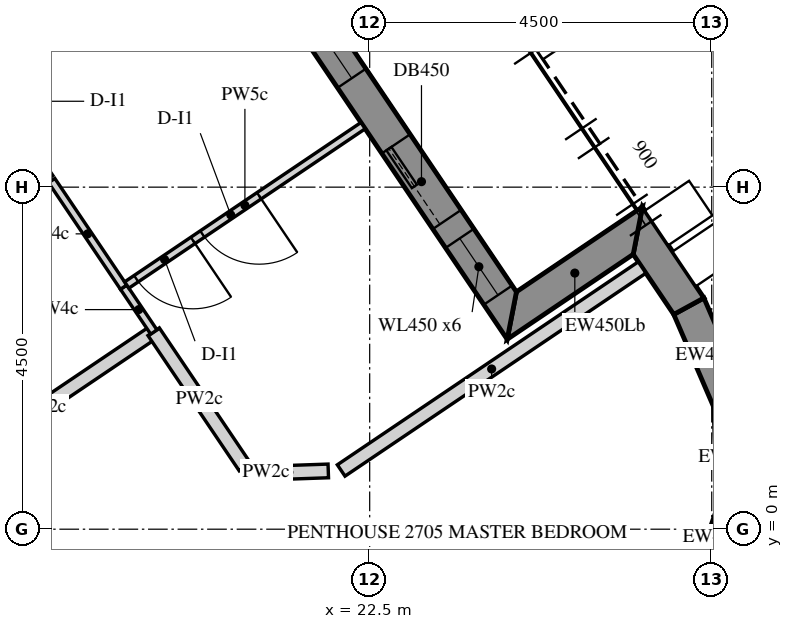
"""IFC4 building model, lengths in metres.
Left out: names, types, materials, properties, quantities, classifications, styles, units other than length and angle.
Written with IfcOpenShell. Run it as: python <this file> out.ifc"""

import sys

from ifc_helpers import new_model, si_unit, direction, frame, frame_2d, origin, place, context, subcontext, project, spatial, polyline, rectangle, outline, extrude, element, fill, save


model = new_model("IFC4")
c1 = context("Model", 3, precision=1e-05, world=origin(), true_north=direction((0.0, 1.0)))
c2 = subcontext(c1, "Body", "Model", "MODEL_VIEW")
j1 = project(units=[si_unit("LENGTHUNIT", "METRE"), si_unit("PLANEANGLEUNIT", "RADIAN")], contexts=[c1])
p1 = place(None, origin())
s1 = spatial("IfcSite", under=j1, at=p1, CompositionType="ELEMENT")
p2 = place(p1, origin())
s2 = spatial("IfcBuilding", under=s1, at=p2, CompositionType="ELEMENT")
p3 = place(p2, frame((0.0, 0.0, 349.5)))
s3 = spatial("IfcBuildingStorey", under=s2, at=p3, CompositionType="ELEMENT", Elevation=349.5)
p4 = place(p3, frame((26.838, -1.064, 0.0), z_axis=(0.0, 0.0, 1.0), x_axis=(0.331074067573, 0.943604769901, 0.0)))
e1 = element("IfcWall", 1, at=p4, inside=s3, PredefinedType="SOLIDWALL", context=c2, shape_type="SweptSolid", body=[
    extrude(outline(polyline([(-0.021, -0.225), (1.44, -0.225), (1.355, 0.225), (0.021, 0.225), (-0.021, -0.225)])), origin(), (0.0, 0.0, 1.0), 3.75),
])
p5 = place(p3, frame((27.301, 0.254, 0.0), z_axis=(0.0, 0.0, 1.0), x_axis=(-0.034763104447, 0.999395580623, 0.0)))
e2 = element("IfcWall", 2, at=p5, inside=s3, PredefinedType="SOLIDWALL", context=c2, shape_type="SweptSolid", body=[
    extrude(outline(polyline([(-0.042, -0.225), (1.44, -0.225), (1.355, 0.225), (0.042, 0.225), (-0.042, -0.225)])), origin(), (0.0, 0.0, 1.0), 3.75),
])
p6 = place(p3, frame((27.252, 1.651, 0.0), z_axis=(0.0, 0.0, 1.0), x_axis=(-0.396195073027, 0.918166359713, 0.0)))
e3 = element("IfcWall", 3, at=p6, inside=s3, PredefinedType="SOLIDWALL", context=c2, shape_type="SweptSolid", body=[
    extrude(outline(polyline([(-0.042, -0.225), (1.418, -0.225), (1.376, 0.225), (0.042, 0.225), (-0.042, -0.225)])), origin(), (0.0, 0.0, 1.0), 3.75),
])
p7 = place(p3, frame((26.699, 2.934, 0.0), z_axis=(0.0, 0.0, 1.0), x_axis=(-0.559105892217, 0.829096255744, 0.0)))
e4 = element("IfcWall", 4, at=p7, inside=s3, PredefinedType="SOLIDWALL", context=c2, shape_type="SweptSolid", body=[
    extrude(outline(polyline([(-0.021, -0.225), (1.425, -0.225), (0.975, 0.225), (0.021, 0.225), (-0.021, -0.225)])), origin(), (0.0, 0.0, 1.0), 3.75),
])
p8 = place(p3, frame((26.028, 3.929, 0.0), z_axis=(0.0, 0.0, 1.0), x_axis=(-0.829052389485, -0.559170935841, 0.0)))
e5 = element("IfcWall", 5, at=p8, inside=s3, PredefinedType="SOLIDWALL", context=c2, shape_type="SweptSolid", body=[
    extrude(outline(polyline([(-0.225, -0.225), (1.775, -0.225), (2.225, 0.225), (0.225, 0.225), (-0.225, -0.225)])), origin(), (0.0, 0.0, 1.0), 3.75),
])
p9 = place(p3, frame((24.37, 2.811, 0.0), z_axis=(0.0, 0.0, 1.0), x_axis=(-0.559187034749, 0.829041531027, 0.0)))
e6 = element("IfcWall", 6, at=p9, inside=s3, PredefinedType="SOLIDWALL", context=c2, shape_type="SweptSolid", body=[
    extrude(outline(polyline([(0.225, -0.225), (20.506, -0.225), (20.957, 0.225), (-0.225, 0.225), (0.225, -0.225)])), origin(), (0.0, 0.0, 1.0), 3.75),
])
p10 = place(p9, frame((0.325, 0.0, 0.9)))
e7 = element("IfcOpeningElement", 7, at=p10, cuts=e6, PredefinedType="OPENING", context=c2, shape_type="SweptSolid", body=[
    extrude(rectangle(XDim=0.9, YDim=1.5, at=frame_2d((0.45, 0.75))), frame((0.0, 0.235, 0.0), z_axis=(0.0, -1.0, 0.0), x_axis=(1.0, 0.0, 0.0)), (0.0, 0.0, 1.0), 0.47),
])
p11 = place(p9, frame((1.525, 0.0, 0.0)))
e8 = element("IfcOpeningElement", 8, at=p11, cuts=e6, PredefinedType="OPENING", context=c2, shape_type="SweptSolid", body=[
    extrude(rectangle(XDim=1.2, YDim=2.4, at=frame_2d((0.6, 1.2))), frame((0.0, 0.235, 0.0), z_axis=(0.0, -1.0, 0.0), x_axis=(1.0, 0.0, 0.0)), (0.0, 0.0, 1.0), 0.47),
])
p12 = place(p9, frame((3.766, 0.0, 0.9)))
e9 = element("IfcOpeningElement", 9, at=p12, cuts=e6, PredefinedType="OPENING", context=c2, shape_type="SweptSolid", body=[
    extrude(rectangle(XDim=0.9, YDim=1.5, at=frame_2d((0.45, 0.75))), frame((0.0, 0.235, 0.0), z_axis=(0.0, -1.0, 0.0), x_axis=(1.0, 0.0, 0.0)), (0.0, 0.0, 1.0), 0.47),
])
p13 = place(p9, frame((4.966, 0.0, 0.0)))
e10 = element("IfcOpeningElement", 10, at=p13, cuts=e6, PredefinedType="OPENING", context=c2, shape_type="SweptSolid", body=[
    extrude(rectangle(XDim=1.2, YDim=2.4, at=frame_2d((0.6, 1.2))), frame((0.0, 0.235, 0.0), z_axis=(0.0, -1.0, 0.0), x_axis=(1.0, 0.0, 0.0)), (0.0, 0.0, 1.0), 0.47),
])
p14 = place(p9, frame((7.366, 0.0, 0.9)))
e11 = element("IfcOpeningElement", 11, at=p14, cuts=e6, PredefinedType="OPENING", context=c2, shape_type="SweptSolid", body=[
    extrude(rectangle(XDim=0.9, YDim=1.5, at=frame_2d((0.45, 0.75))), frame((0.0, 0.235, 0.0), z_axis=(0.0, -1.0, 0.0), x_axis=(1.0, 0.0, 0.0)), (0.0, 0.0, 1.0), 0.47),
])
p15 = place(p9, frame((8.566, 0.0, 0.0)))
e12 = element("IfcOpeningElement", 12, at=p15, cuts=e6, PredefinedType="OPENING", context=c2, shape_type="SweptSolid", body=[
    extrude(rectangle(XDim=1.2, YDim=2.4, at=frame_2d((0.6, 1.2))), frame((0.0, 0.235, 0.0), z_axis=(0.0, -1.0, 0.0), x_axis=(1.0, 0.0, 0.0)), (0.0, 0.0, 1.0), 0.47),
])
p16 = place(p9, frame((10.966, 0.0, 0.9)))
e13 = element("IfcOpeningElement", 13, at=p16, cuts=e6, PredefinedType="OPENING", context=c2, shape_type="SweptSolid", body=[
    extrude(rectangle(XDim=0.9, YDim=1.5, at=frame_2d((0.45, 0.75))), frame((0.0, 0.235, 0.0), z_axis=(0.0, -1.0, 0.0), x_axis=(1.0, 0.0, 0.0)), (0.0, 0.0, 1.0), 0.47),
])
p17 = place(p9, frame((12.166, 0.0, 0.0)))
e14 = element("IfcOpeningElement", 14, at=p17, cuts=e6, PredefinedType="OPENING", context=c2, shape_type="SweptSolid", body=[
    extrude(rectangle(XDim=1.2, YDim=2.4, at=frame_2d((0.6, 1.2))), frame((0.0, 0.235, 0.0), z_axis=(0.0, -1.0, 0.0), x_axis=(1.0, 0.0, 0.0)), (0.0, 0.0, 1.0), 0.47),
])
p18 = place(p9, frame((14.566, 0.0, 0.9)))
e15 = element("IfcOpeningElement", 15, at=p18, cuts=e6, PredefinedType="OPENING", context=c2, shape_type="SweptSolid", body=[
    extrude(rectangle(XDim=0.9, YDim=1.5, at=frame_2d((0.45, 0.75))), frame((0.0, 0.235, 0.0), z_axis=(0.0, -1.0, 0.0), x_axis=(1.0, 0.0, 0.0)), (0.0, 0.0, 1.0), 0.47),
])
p19 = place(p9, frame((15.766, 0.0, 0.0)))
e16 = element("IfcOpeningElement", 16, at=p19, cuts=e6, PredefinedType="OPENING", context=c2, shape_type="SweptSolid", body=[
    extrude(rectangle(XDim=1.2, YDim=2.4, at=frame_2d((0.6, 1.2))), frame((0.0, 0.235, 0.0), z_axis=(0.0, -1.0, 0.0), x_axis=(1.0, 0.0, 0.0)), (0.0, 0.0, 1.0), 0.47),
])
p20 = place(p9, frame((18.007, 0.0, 0.9)))
e17 = element("IfcOpeningElement", 17, at=p20, cuts=e6, PredefinedType="OPENING", context=c2, shape_type="SweptSolid", body=[
    extrude(rectangle(XDim=0.9, YDim=1.5, at=frame_2d((0.45, 0.75))), frame((0.0, 0.235, 0.0), z_axis=(0.0, -1.0, 0.0), x_axis=(1.0, 0.0, 0.0)), (0.0, 0.0, 1.0), 0.47),
])
p21 = place(p9, frame((19.207, 0.0, 0.0)))
e18 = element("IfcOpeningElement", 18, at=p21, cuts=e6, PredefinedType="OPENING", context=c2, shape_type="SweptSolid", body=[
    extrude(rectangle(XDim=1.2, YDim=2.4, at=frame_2d((0.6, 1.2))), frame((0.0, 0.235, 0.0), z_axis=(0.0, -1.0, 0.0), x_axis=(1.0, 0.0, 0.0)), (0.0, 0.0, 1.0), 0.47),
])
p22 = place(p3, frame((19.66, 2.595, 0.0), z_axis=(0.0, 0.0, 1.0), x_axis=(-0.829033300448, -0.559199237078, 0.0)))
e19 = element("IfcWall", 19, at=p22, inside=s3, PredefinedType="PARTITIONING", context=c2, shape_type="SweptSolid", body=[
    extrude(rectangle(XDim=3.525, YDim=0.18, at=frame_2d((1.763, 0.0))), origin(), (0.0, 0.0, 1.0), 2.82),
])
p23 = place(p3, frame((26.084, 3.443, 0.0), z_axis=(0.0, 0.0, 1.0), x_axis=(-0.829033545972, -0.559198873079, 0.0)))
e20 = element("IfcWall", 20, at=p23, inside=s3, PredefinedType="PARTITIONING", context=c2, shape_type="SweptSolid", body=[
    extrude(rectangle(XDim=4.775, YDim=0.18, at=frame_2d((2.388, 0.0))), origin(), (0.0, 0.0, 1.0), 2.82),
])
p24 = place(p3, frame((21.955, 0.767, 0.0), z_axis=(0.0, 0.0, 1.0), x_axis=(-0.999394211814, -0.034802433729, 0.0)))
e21 = element("IfcWall", 21, at=p24, inside=s3, PredefinedType="PARTITIONING", context=c2, shape_type="SweptSolid", body=[
    extrude(rectangle(XDim=1.038, YDim=0.18, at=frame_2d((0.519, 0.0))), origin(), (0.0, 0.0, 1.0), 2.82),
])
p25 = place(p3, frame((20.858, 0.818, 0.0), z_axis=(0.0, 0.0, 1.0), x_axis=(-0.55920528272, 0.829029222512, 0.0)))
e22 = element("IfcWall", 22, at=p25, inside=s3, PredefinedType="PARTITIONING", context=c2, shape_type="SweptSolid", body=[
    extrude(rectangle(XDim=2.147, YDim=0.18, at=frame_2d((1.074, 0.0))), origin(), (0.0, 0.0, 1.0), 2.82),
])
p26 = place(p3, frame((18.291, 4.625, 0.0), z_axis=(0.0, 0.0, 1.0), x_axis=(-0.55916115895, 0.82905898362, 0.0)))
e23 = element("IfcWall", 23, at=p26, inside=s3, PredefinedType="PARTITIONING", context=c2, shape_type="SweptSolid", body=[
    extrude(rectangle(XDim=3.404, YDim=0.1, at=frame_2d((1.702, 0.0))), origin(), (0.0, 0.0, 1.0), 2.82),
])
p27 = place(p26, frame((0.762, 0.0, 0.0)))
e24 = element("IfcOpeningElement", 24, at=p27, cuts=e23, PredefinedType="OPENING", context=c2, shape_type="SweptSolid", body=[
    extrude(rectangle(XDim=0.9, YDim=2.1, at=frame_2d((0.45, 1.05))), frame((0.0, 0.06, 0.0), z_axis=(0.0, -1.0, 0.0), x_axis=(1.0, 0.0, 0.0)), (0.0, 0.0, 1.0), 0.12),
])
p28 = place(p26, frame((2.182, 0.0, 0.0)))
e25 = element("IfcOpeningElement", 25, at=p28, cuts=e23, PredefinedType="OPENING", context=c2, shape_type="SweptSolid", body=[
    extrude(rectangle(XDim=0.9, YDim=2.1, at=frame_2d((0.45, 1.05))), frame((0.0, 0.06, 0.0), z_axis=(0.0, -1.0, 0.0), x_axis=(1.0, 0.0, 0.0)), (0.0, 0.0, 1.0), 0.12),
])
p29 = place(p3, frame((19.661, 2.594, 0.0), z_axis=(0.0, 0.0, 1.0), x_axis=(-0.559278611344, 0.828979755418, 0.0)))
e26 = element("IfcWall", 26, at=p29, inside=s3, PredefinedType="PARTITIONING", context=c2, shape_type="SweptSolid", body=[
    extrude(rectangle(XDim=0.712, YDim=0.1, at=frame_2d((0.356, 0.0))), origin(), (0.0, 0.0, 1.0), 2.82),
])
p30 = place(p3, frame((19.262, 3.184, 0.0), z_axis=(0.0, 0.0, 1.0), x_axis=(-0.559155511525, 0.829062792514, 0.0)))
e27 = element("IfcWall", 27, at=p30, inside=s3, PredefinedType="PARTITIONING", context=c2, shape_type="SweptSolid", body=[
    extrude(rectangle(XDim=1.691, YDim=0.1, at=frame_2d((0.846, 0.0))), origin(), (0.0, 0.0, 1.0), 2.82),
])
p31 = place(p3, frame((22.413, 5.309, 0.0), z_axis=(0.0, 0.0, 1.0), x_axis=(-0.829013169089, -0.559229081394, 0.0)))
e28 = element("IfcWall", 28, at=p31, inside=s3, PredefinedType="PARTITIONING", context=c2, shape_type="SweptSolid", body=[
    extrude(rectangle(XDim=3.75, YDim=0.1, at=frame_2d((1.875, 0.0))), origin(), (0.0, 0.0, 1.0), 2.82),
])
p32 = place(p31, frame((2.7, 0.0, 0.0)))
e29 = element("IfcOpeningElement", 29, at=p32, cuts=e28, PredefinedType="OPENING", context=c2, shape_type="SweptSolid", body=[
    extrude(rectangle(XDim=0.9, YDim=2.1, at=frame_2d((0.45, 1.05))), frame((0.0, 0.06, 0.0), z_axis=(0.0, -1.0, 0.0), x_axis=(1.0, 0.0, 0.0)), (0.0, 0.0, 1.0), 0.12),
])
p33 = place(p31, frame((1.65, 0.0, 0.0)))
e30 = element("IfcOpeningElement", 30, at=p33, cuts=e28, PredefinedType="OPENING", context=c2, shape_type="SweptSolid", body=[
    extrude(rectangle(XDim=0.9, YDim=2.1, at=frame_2d((0.45, 1.05))), frame((0.0, 0.06, 0.0), z_axis=(0.0, -1.0, 0.0), x_axis=(1.0, 0.0, 0.0)), (0.0, 0.0, 1.0), 0.12),
])
p34 = place(p3, frame((20.4, 8.294, 0.0), z_axis=(0.0, 0.0, 1.0), x_axis=(-0.829043350963, -0.559184336534, 0.0)))
e31 = element("IfcWall", 31, at=p34, inside=s3, PredefinedType="PARTITIONING", context=c2, shape_type="SweptSolid", body=[
    extrude(rectangle(XDim=3.75, YDim=0.1, at=frame_2d((1.875, 0.0))), origin(), (0.0, 0.0, 1.0), 2.82),
])
p35 = place(p10, frame((0.0, 0.155, 0.0)))
e32 = element("IfcWindow", 32, at=p35, inside=s3, PartitioningType="SINGLE_PANEL", PredefinedType="WINDOW", context=c2, shape_type="SweptSolid", body=[
    extrude(rectangle(XDim=0.9, YDim=1.5, at=frame_2d((0.45, 0.75))), frame((0.0, 0.03, 0.0), z_axis=(0.0, -1.0, 0.0), x_axis=(1.0, 0.0, 0.0)), (0.0, 0.0, 1.0), 0.06),
])
fill(e7, e32)
p36 = place(p11, frame((0.0, 0.15, 0.0)))
e33 = element("IfcDoor", 33, at=p36, inside=s3, OperationType="SLIDING_TO_LEFT", PredefinedType="DOOR", context=c2, shape_type="SweptSolid", body=[
    extrude(rectangle(XDim=1.2, YDim=2.4, at=frame_2d((0.6, 1.2))), frame((0.0, 0.025, 0.0), z_axis=(0.0, -1.0, 0.0), x_axis=(1.0, 0.0, 0.0)), (0.0, 0.0, 1.0), 0.05),
])
fill(e8, e33)
p37 = place(p12, frame((0.0, 0.155, 0.0)))
e34 = element("IfcWindow", 34, at=p37, inside=s3, PartitioningType="SINGLE_PANEL", PredefinedType="WINDOW", context=c2, shape_type="SweptSolid", body=[
    extrude(rectangle(XDim=0.9, YDim=1.5, at=frame_2d((0.45, 0.75))), frame((0.0, 0.03, 0.0), z_axis=(0.0, -1.0, 0.0), x_axis=(1.0, 0.0, 0.0)), (0.0, 0.0, 1.0), 0.06),
])
fill(e9, e34)
p38 = place(p32, origin())
e35 = element("IfcDoor", 35, at=p38, inside=s3, OperationType="SINGLE_SWING_RIGHT", PredefinedType="DOOR", context=c2, shape_type="SweptSolid", body=[
    extrude(rectangle(XDim=0.9, YDim=2.1, at=frame_2d((0.45, 1.05))), frame((0.0, 0.025, 0.0), z_axis=(0.0, -1.0, 0.0), x_axis=(1.0, 0.0, 0.0)), (0.0, 0.0, 1.0), 0.05),
])
fill(e29, e35)
p39 = place(p33, origin())
e36 = element("IfcDoor", 36, at=p39, inside=s3, OperationType="SINGLE_SWING_LEFT", PredefinedType="DOOR", context=c2, shape_type="SweptSolid", body=[
    extrude(rectangle(XDim=0.9, YDim=2.1, at=frame_2d((0.45, 1.05))), frame((0.0, 0.025, 0.0), z_axis=(0.0, -1.0, 0.0), x_axis=(1.0, 0.0, 0.0)), (0.0, 0.0, 1.0), 0.05),
])
fill(e30, e36)
save(model, sys.argv[1])
